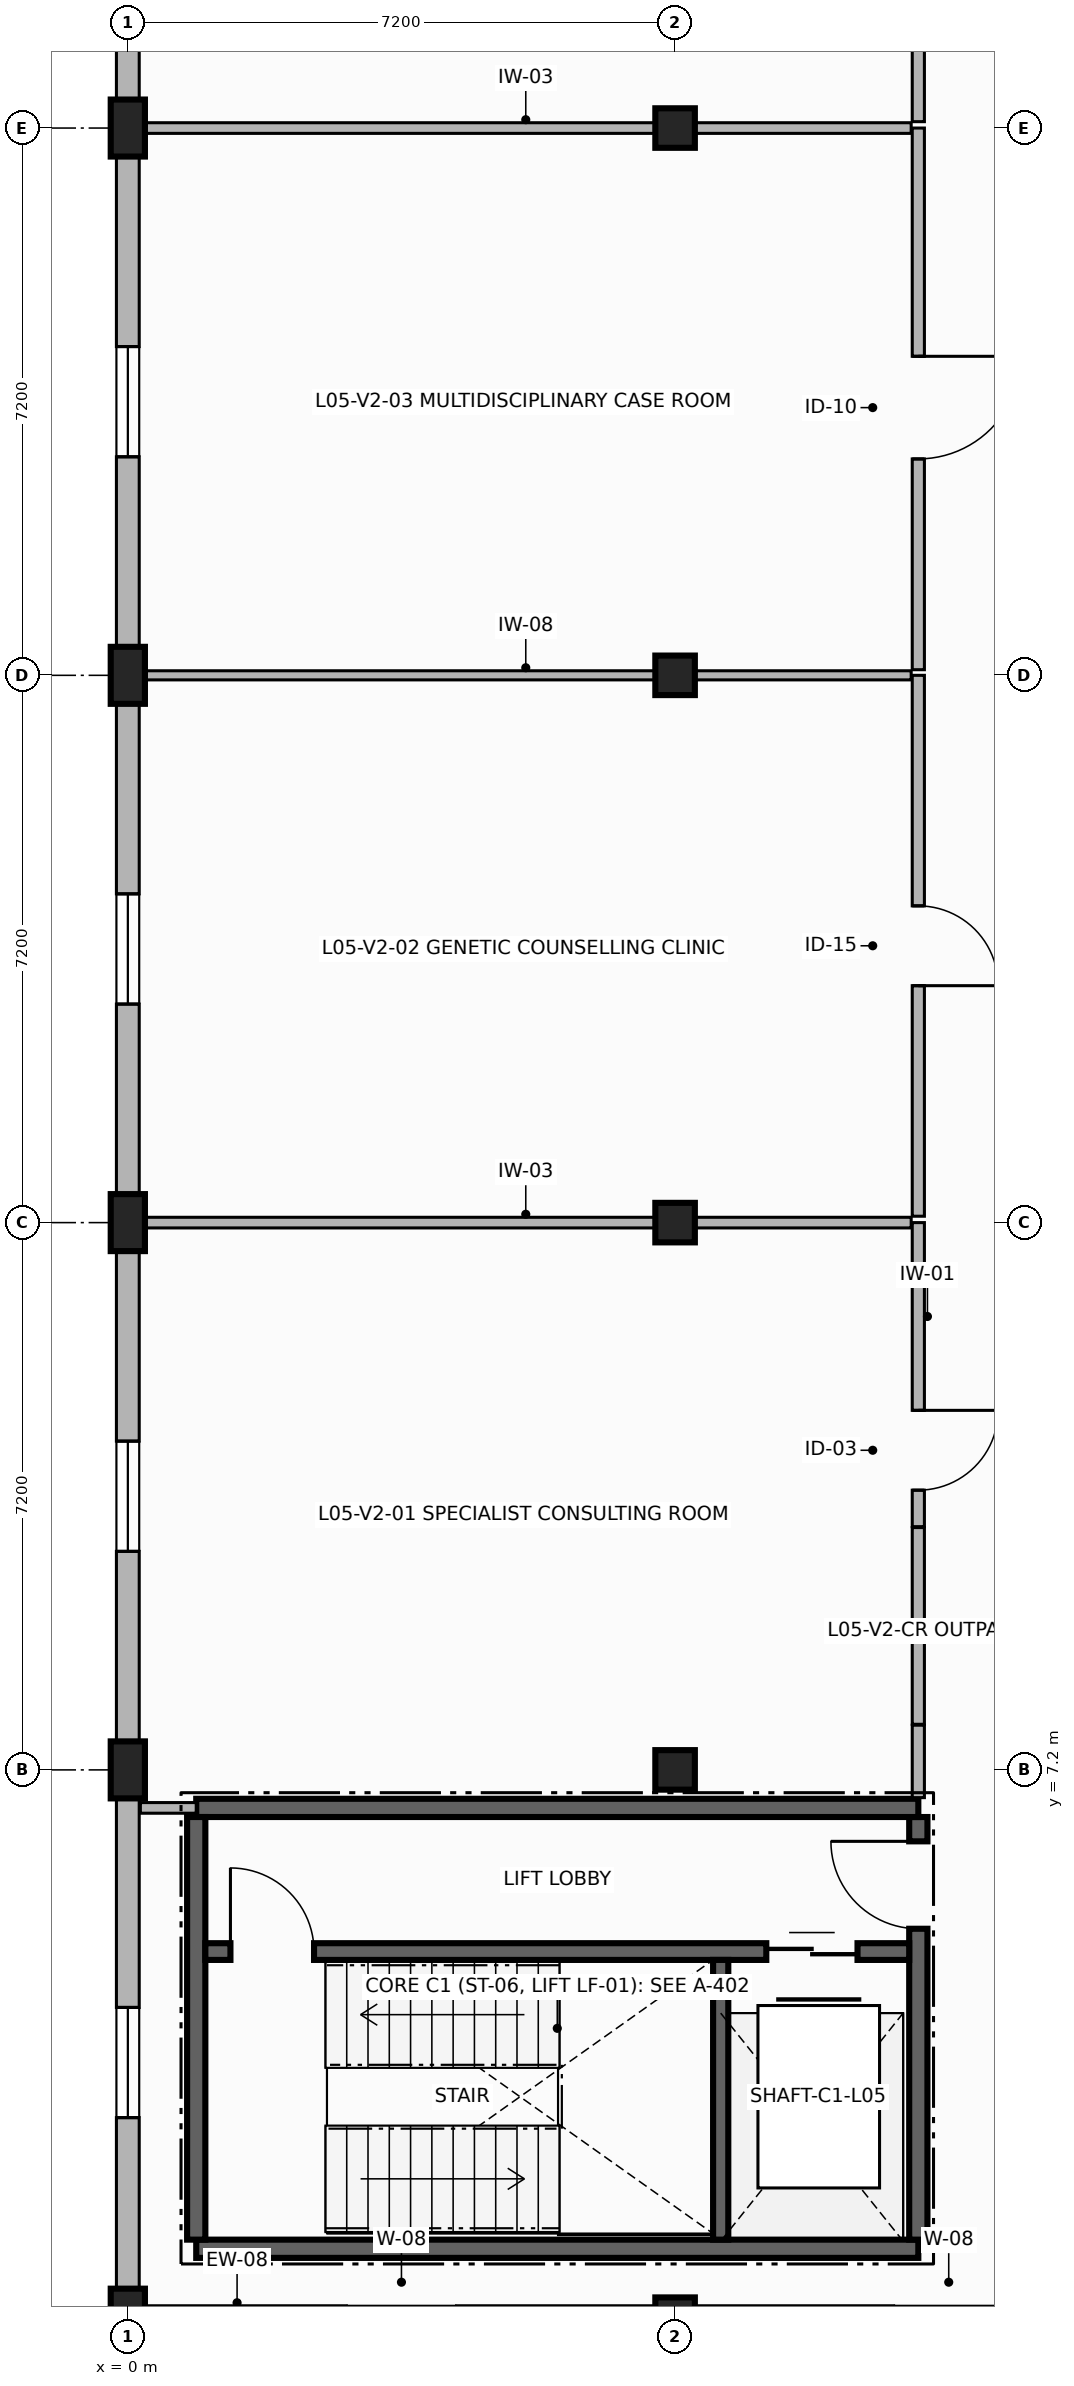
"""IFC4 building model, lengths in metres.
Left out: names, types, materials, properties, quantities, classifications, styles, units other than length and angle.
Written with IfcOpenShell. Run it as: python <this file> out.ifc"""

import sys

from ifc_helpers import new_model, si_unit, direction, frame, frame_2d, origin, origin_with_axes, origin_2d, place, context, subcontext, project, spatial, rectangle, extrude, element, fill, save


model = new_model("IFC4")
c1 = context("Model", 3, precision=1e-05, world=origin(), true_north=direction((0.0, 1.0)))
c2 = subcontext(c1, "Body", "Model", "MODEL_VIEW")
j1 = project(units=[si_unit("LENGTHUNIT", "METRE"), si_unit("PLANEANGLEUNIT", "RADIAN")], contexts=[c1])
p1 = place(None, origin())
s1 = spatial("IfcSite", under=j1, at=p1, CompositionType="ELEMENT")
p2 = place(p1, origin())
s2 = spatial("IfcBuilding", under=s1, at=p2, CompositionType="ELEMENT")
p3 = place(p2, frame((0.0, 0.0, 19.7)))
s3 = spatial("IfcBuildingStorey", under=s2, at=p3, CompositionType="ELEMENT", Elevation=19.7)
for number, where, z_axis, x_axis in (
    (1, (0.0, 0.0, 0.0), (0.0, 0.0, 1.0), (1.0, 0.0, 0.0)),
    (2, (0.0, 7.2, 0.0), (0.0, 0.0, 1.0), (1.0, 0.0, 0.0)),
    (3, (0.0, 14.4, 0.0), (0.0, 0.0, 1.0), (1.0, 0.0, 0.0)),
    (4, (0.0, 21.6, 0.0), (0.0, 0.0, 1.0), (1.0, 0.0, 0.0)),
    (5, (0.0, 28.8, 0.0), (0.0, 0.0, 1.0), (1.0, 0.0, 0.0)),
):
    element("IfcColumn", number, at=place(p3, frame(where, z_axis=z_axis, x_axis=x_axis)), inside=s3, PredefinedType="PILASTER", context=c2, shape_type="SweptSolid", body=[
        extrude(rectangle(XDim=0.45, YDim=0.75, at=origin_2d()), origin(), (0.0, 0.0, 1.0), 3.42),
    ])
for number, where, z_axis, x_axis in (
    (6, (7.2, 0.0, 0.0), (0.0, 0.0, 1.0), (1.0, 0.0, 0.0)),
    (7, (7.2, 7.2, 0.0), (0.0, 0.0, 1.0), (1.0, 0.0, 0.0)),
    (8, (7.2, 14.4, 0.0), (0.0, 0.0, 1.0), (1.0, 0.0, 0.0)),
    (9, (7.2, 21.6, 0.0), (0.0, 0.0, 1.0), (1.0, 0.0, 0.0)),
    (10, (7.2, 28.8, 0.0), (0.0, 0.0, 1.0), (1.0, 0.0, 0.0)),
):
    element("IfcColumn", number, at=place(p3, frame(where, z_axis=z_axis, x_axis=x_axis)), inside=s3, PredefinedType="COLUMN", context=c2, shape_type="SweptSolid", body=[
        extrude(rectangle(XDim=0.52, YDim=0.52, at=origin_2d()), origin(), (0.0, 0.0, 1.0), 3.42),
    ])
p4 = place(p3, origin_with_axes())
e11 = element("IfcWall", 11, at=p4, inside=s3, PredefinedType="SOLIDWALL", context=c2, shape_type="SweptSolid", body=[
    extrude(rectangle(XDim=7.2, YDim=0.3, at=frame_2d((3.6, 0.0))), origin(), (0.0, 0.0, 1.0), 2.8),
])
p5 = place(p4, frame((2.875, 0.0, 0.85)))
e12 = element("IfcOpeningElement", 12, at=p5, cuts=e11, PredefinedType="OPENING", context=c2, shape_type="SweptSolid", body=[
    extrude(rectangle(XDim=1.45, YDim=1.75, at=frame_2d((0.725, 0.875))), frame((0.0, 0.16, 0.0), z_axis=(0.0, -1.0, 0.0), x_axis=(1.0, 0.0, 0.0)), (0.0, 0.0, 1.0), 0.32),
])
p6 = place(p3, frame((7.2, 0.0, 0.0), z_axis=(0.0, 0.0, 1.0), x_axis=(1.0, 0.0, 0.0)))
e13 = element("IfcWall", 13, at=p6, inside=s3, PredefinedType="SOLIDWALL", context=c2, shape_type="SweptSolid", body=[
    extrude(rectangle(XDim=7.2, YDim=0.3, at=frame_2d((3.6, 0.0))), origin(), (0.0, 0.0, 1.0), 2.8),
])
p7 = place(p6, frame((2.875, 0.0, 0.85)))
e14 = element("IfcOpeningElement", 14, at=p7, cuts=e13, PredefinedType="OPENING", context=c2, shape_type="SweptSolid", body=[
    extrude(rectangle(XDim=1.45, YDim=1.75, at=frame_2d((0.725, 0.875))), frame((0.0, 0.16, 0.0), z_axis=(0.0, -1.0, 0.0), x_axis=(1.0, 0.0, 0.0)), (0.0, 0.0, 1.0), 0.32),
])
p8 = place(p3, frame((0.0, 36.0, 0.0), z_axis=(0.0, 0.0, 1.0), x_axis=(0.0, -1.0, 0.0)))
e15 = element("IfcWall", 15, at=p8, inside=s3, PredefinedType="SOLIDWALL", context=c2, shape_type="SweptSolid", body=[
    extrude(rectangle(XDim=7.2, YDim=0.3, at=frame_2d((3.6, 0.0))), origin(), (0.0, 0.0, 1.0), 2.8),
])
p9 = place(p8, frame((2.875, 0.0, 0.85)))
e16 = element("IfcOpeningElement", 16, at=p9, cuts=e15, PredefinedType="OPENING", context=c2, shape_type="SweptSolid", body=[
    extrude(rectangle(XDim=1.45, YDim=1.75, at=frame_2d((0.725, 0.875))), frame((0.0, 0.16, 0.0), z_axis=(0.0, -1.0, 0.0), x_axis=(1.0, 0.0, 0.0)), (0.0, 0.0, 1.0), 0.32),
])
p10 = place(p3, frame((0.0, 28.8, 0.0), z_axis=(0.0, 0.0, 1.0), x_axis=(0.0, -1.0, 0.0)))
e17 = element("IfcWall", 17, at=p10, inside=s3, PredefinedType="SOLIDWALL", context=c2, shape_type="SweptSolid", body=[
    extrude(rectangle(XDim=7.2, YDim=0.3, at=frame_2d((3.6, 0.0))), origin(), (0.0, 0.0, 1.0), 2.8),
])
p11 = place(p10, frame((2.875, 0.0, 0.85)))
e18 = element("IfcOpeningElement", 18, at=p11, cuts=e17, PredefinedType="OPENING", context=c2, shape_type="SweptSolid", body=[
    extrude(rectangle(XDim=1.45, YDim=1.75, at=frame_2d((0.725, 0.875))), frame((0.0, 0.16, 0.0), z_axis=(0.0, -1.0, 0.0), x_axis=(1.0, 0.0, 0.0)), (0.0, 0.0, 1.0), 0.32),
])
p12 = place(p3, frame((0.0, 21.6, 0.0), z_axis=(0.0, 0.0, 1.0), x_axis=(0.0, -1.0, 0.0)))
e19 = element("IfcWall", 19, at=p12, inside=s3, PredefinedType="SOLIDWALL", context=c2, shape_type="SweptSolid", body=[
    extrude(rectangle(XDim=7.2, YDim=0.3, at=frame_2d((3.6, 0.0))), origin(), (0.0, 0.0, 1.0), 2.8),
])
p13 = place(p12, frame((2.875, 0.0, 0.85)))
e20 = element("IfcOpeningElement", 20, at=p13, cuts=e19, PredefinedType="OPENING", context=c2, shape_type="SweptSolid", body=[
    extrude(rectangle(XDim=1.45, YDim=1.75, at=frame_2d((0.725, 0.875))), frame((0.0, 0.16, 0.0), z_axis=(0.0, -1.0, 0.0), x_axis=(1.0, 0.0, 0.0)), (0.0, 0.0, 1.0), 0.32),
])
p14 = place(p3, frame((0.0, 14.4, 0.0), z_axis=(0.0, 0.0, 1.0), x_axis=(0.0, -1.0, 0.0)))
e21 = element("IfcWall", 21, at=p14, inside=s3, PredefinedType="SOLIDWALL", context=c2, shape_type="SweptSolid", body=[
    extrude(rectangle(XDim=7.2, YDim=0.3, at=frame_2d((3.6, 0.0))), origin(), (0.0, 0.0, 1.0), 2.8),
])
p15 = place(p14, frame((2.875, 0.0, 0.85)))
e22 = element("IfcOpeningElement", 22, at=p15, cuts=e21, PredefinedType="OPENING", context=c2, shape_type="SweptSolid", body=[
    extrude(rectangle(XDim=1.45, YDim=1.75, at=frame_2d((0.725, 0.875))), frame((0.0, 0.16, 0.0), z_axis=(0.0, -1.0, 0.0), x_axis=(1.0, 0.0, 0.0)), (0.0, 0.0, 1.0), 0.32),
])
p16 = place(p3, frame((0.0, 7.2, 0.0), z_axis=(0.0, 0.0, 1.0), x_axis=(0.0, -1.0, 0.0)))
e23 = element("IfcWall", 23, at=p16, inside=s3, PredefinedType="SOLIDWALL", context=c2, shape_type="SweptSolid", body=[
    extrude(rectangle(XDim=7.2, YDim=0.3, at=frame_2d((3.6, 0.0))), origin(), (0.0, 0.0, 1.0), 2.8),
])
p17 = place(p16, frame((3.125, 0.0, 0.85)))
e24 = element("IfcOpeningElement", 24, at=p17, cuts=e23, PredefinedType="OPENING", context=c2, shape_type="SweptSolid", body=[
    extrude(rectangle(XDim=1.45, YDim=1.75, at=frame_2d((0.725, 0.875))), frame((0.0, 0.16, 0.0), z_axis=(0.0, -1.0, 0.0), x_axis=(1.0, 0.0, 0.0)), (0.0, 0.0, 1.0), 0.32),
])
p18 = place(p3, frame((0.9, 0.9, 0.0), z_axis=(0.0, 0.0, 1.0), x_axis=(1.0, 0.0, 0.0)))
e25 = element("IfcWall", 25, at=p18, inside=s3, PredefinedType="SHEAR", context=c2, shape_type="SweptSolid", body=[
    extrude(rectangle(XDim=9.5, YDim=0.24, at=frame_2d((4.75, 0.0))), origin(), (0.0, 0.0, 1.0), 3.42),
])
p19 = place(p3, frame((10.4, 1.02, 0.0), z_axis=(0.0, 0.0, 1.0), x_axis=(0.0, 1.0, 0.0)))
e26 = element("IfcWall", 26, at=p19, inside=s3, PredefinedType="SHEAR", context=c2, shape_type="SweptSolid", body=[
    extrude(rectangle(XDim=5.56, YDim=0.24, at=frame_2d((2.78, 0.0))), origin(), (0.0, 0.0, 1.0), 3.42),
])
p20 = place(p19, frame((4.09, 0.0, 0.0)))
e27 = element("IfcOpeningElement", 27, at=p20, cuts=e26, PredefinedType="OPENING", context=c2, shape_type="SweptSolid", body=[
    extrude(rectangle(XDim=1.15, YDim=2.2, at=frame_2d((0.575, 1.1))), frame((0.0, 0.13, 0.0), z_axis=(0.0, -1.0, 0.0), x_axis=(1.0, 0.0, 0.0)), (0.0, 0.0, 1.0), 0.26),
])
p21 = place(p3, frame((10.4, 6.7, 0.0), z_axis=(0.0, 0.0, 1.0), x_axis=(-1.0, 0.0, 0.0)))
e28 = element("IfcWall", 28, at=p21, inside=s3, PredefinedType="SHEAR", context=c2, shape_type="SweptSolid", body=[
    extrude(rectangle(XDim=9.5, YDim=0.24, at=frame_2d((4.75, 0.0))), origin(), (0.0, 0.0, 1.0), 3.42),
])
p22 = place(p3, frame((0.9, 6.58, 0.0), z_axis=(0.0, 0.0, 1.0), x_axis=(0.0, -1.0, 0.0)))
e29 = element("IfcWall", 29, at=p22, inside=s3, PredefinedType="SHEAR", context=c2, shape_type="SweptSolid", body=[
    extrude(rectangle(XDim=5.56, YDim=0.24, at=frame_2d((2.78, 0.0))), origin(), (0.0, 0.0, 1.0), 3.42),
])
p23 = place(p3, frame((1.02, 4.81, 0.0), z_axis=(0.0, 0.0, 1.0), x_axis=(1.0, 0.0, 0.0)))
e30 = element("IfcWall", 30, at=p23, inside=s3, PredefinedType="SHEAR", context=c2, shape_type="SweptSolid", body=[
    extrude(rectangle(XDim=9.26, YDim=0.22, at=frame_2d((4.63, 0.0))), origin(), (0.0, 0.0, 1.0), 3.42),
])
p24 = place(p23, frame((0.33, 0.0, 0.0)))
e31 = element("IfcOpeningElement", 31, at=p24, cuts=e30, PredefinedType="OPENING", context=c2, shape_type="SweptSolid", body=[
    extrude(rectangle(XDim=1.1, YDim=2.15, at=frame_2d((0.55, 1.075))), frame((0.0, 0.12, 0.0), z_axis=(0.0, -1.0, 0.0), x_axis=(1.0, 0.0, 0.0)), (0.0, 0.0, 1.0), 0.24),
])
p25 = place(p23, frame((7.38, 0.0, 0.0)))
e32 = element("IfcOpeningElement", 32, at=p25, cuts=e30, PredefinedType="OPENING", context=c2, shape_type="SweptSolid", body=[
    extrude(rectangle(XDim=1.2, YDim=2.2, at=frame_2d((0.6, 1.1))), frame((0.0, 0.12, 0.0), z_axis=(0.0, -1.0, 0.0), x_axis=(1.0, 0.0, 0.0)), (0.0, 0.0, 1.0), 0.24),
])
p26 = place(p3, frame((7.8, 1.02, 0.0), z_axis=(0.0, 0.0, 1.0), x_axis=(0.0, 1.0, 0.0)))
e33 = element("IfcWall", 33, at=p26, inside=s3, PredefinedType="SHEAR", context=c2, shape_type="SweptSolid", body=[
    extrude(rectangle(XDim=3.68, YDim=0.2, at=frame_2d((1.84, 0.0))), origin(), (0.0, 0.0, 1.0), 3.42),
])
p27 = place(p3, frame((10.4, 14.4, 0.0), z_axis=(0.0, 0.0, 1.0), x_axis=(0.0, -1.0, 0.0)))
e34 = element("IfcWall", 34, at=p27, inside=s3, PredefinedType="PARTITIONING", context=c2, shape_type="SweptSolid", body=[
    extrude(rectangle(XDim=4.0, YDim=0.16, at=frame_2d((2.0, 0.0))), origin(), (0.0, 0.0, 1.0), 2.78),
])
p28 = place(p27, frame((2.47, 0.0, 0.0)))
e35 = element("IfcOpeningElement", 35, at=p28, cuts=e34, PredefinedType="OPENING", context=c2, shape_type="SweptSolid", body=[
    extrude(rectangle(XDim=1.05, YDim=2.15, at=frame_2d((0.525, 1.075))), frame((0.0, 0.09, 0.0), z_axis=(0.0, -1.0, 0.0), x_axis=(1.0, 0.0, 0.0)), (0.0, 0.0, 1.0), 0.18),
])
p29 = place(p3, frame((10.4, 10.388, 0.0), z_axis=(0.0, 0.0, 1.0), x_axis=(0.0, -1.0, 0.0)))
e36 = element("IfcWall", 36, at=p29, inside=s3, PredefinedType="PARTITIONING", context=c2, shape_type="SweptSolid", body=[
    extrude(rectangle(XDim=2.588, YDim=0.16, at=frame_2d((1.294, 0.0))), origin(), (0.0, 0.0, 1.0), 2.78),
])
p30 = place(p3, frame((10.4, 7.788, 0.0), z_axis=(0.0, 0.0, 1.0), x_axis=(0.0, -1.0, 0.0)))
e37 = element("IfcWall", 37, at=p30, inside=s3, PredefinedType="PARTITIONING", context=c2, shape_type="SweptSolid", body=[
    extrude(rectangle(XDim=0.953, YDim=0.16, at=frame_2d((0.477, 0.0))), origin(), (0.0, 0.0, 1.0), 2.78),
])
p31 = place(p3, frame((0.9, 6.7, 0.0), z_axis=(0.0, 0.0, 1.0), x_axis=(-1.0, 0.0, 0.0)))
e38 = element("IfcWall", 38, at=p31, inside=s3, PredefinedType="PARTITIONING", context=c2, shape_type="SweptSolid", body=[
    extrude(rectangle(XDim=0.735, YDim=0.14, at=frame_2d((0.367, 0.0))), origin(), (0.0, 0.0, 1.0), 2.78),
])
p32 = place(p3, frame((0.165, 14.4, 0.0), z_axis=(0.0, 0.0, 1.0), x_axis=(1.0, 0.0, 0.0)))
e39 = element("IfcWall", 39, at=p32, inside=s3, PredefinedType="PARTITIONING", context=c2, shape_type="SweptSolid", body=[
    extrude(rectangle(XDim=10.141, YDim=0.14, at=frame_2d((5.07, 0.0))), origin(), (0.0, 0.0, 1.0), 2.78),
])
p33 = place(p3, frame((10.4, 21.6, 0.0), z_axis=(0.0, 0.0, 1.0), x_axis=(0.0, -1.0, 0.0)))
e40 = element("IfcWall", 40, at=p33, inside=s3, PredefinedType="PARTITIONING", context=c2, shape_type="SweptSolid", body=[
    extrude(rectangle(XDim=7.116, YDim=0.16, at=frame_2d((3.558, 0.0))), origin(), (0.0, 0.0, 1.0), 2.78),
])
p34 = place(p33, frame((3.033, 0.0, 0.0)))
e41 = element("IfcOpeningElement", 41, at=p34, cuts=e40, PredefinedType="OPENING", context=c2, shape_type="SweptSolid", body=[
    extrude(rectangle(XDim=1.05, YDim=2.2, at=frame_2d((0.525, 1.1))), frame((0.0, 0.09, 0.0), z_axis=(0.0, -1.0, 0.0), x_axis=(1.0, 0.0, 0.0)), (0.0, 0.0, 1.0), 0.18),
])
p35 = place(p3, frame((0.165, 21.6, 0.0), z_axis=(0.0, 0.0, 1.0), x_axis=(1.0, 0.0, 0.0)))
e42 = element("IfcWall", 42, at=p35, inside=s3, PredefinedType="PARTITIONING", context=c2, shape_type="SweptSolid", body=[
    extrude(rectangle(XDim=10.141, YDim=0.12, at=frame_2d((5.07, 0.0))), origin(), (0.0, 0.0, 1.0), 2.78),
])
p36 = place(p3, frame((10.4, 28.8, 0.0), z_axis=(0.0, 0.0, 1.0), x_axis=(0.0, -1.0, 0.0)))
e43 = element("IfcWall", 43, at=p36, inside=s3, PredefinedType="PARTITIONING", context=c2, shape_type="SweptSolid", body=[
    extrude(rectangle(XDim=7.126, YDim=0.16, at=frame_2d((3.563, 0.0))), origin(), (0.0, 0.0, 1.0), 2.78),
])
p37 = place(p36, frame((3.003, 0.0, 0.0)))
e44 = element("IfcOpeningElement", 44, at=p37, cuts=e43, PredefinedType="OPENING", context=c2, shape_type="SweptSolid", body=[
    extrude(rectangle(XDim=1.35, YDim=2.25, at=frame_2d((0.675, 1.125))), frame((0.0, 0.09, 0.0), z_axis=(0.0, -1.0, 0.0), x_axis=(1.0, 0.0, 0.0)), (0.0, 0.0, 1.0), 0.18),
])
p38 = place(p3, frame((0.165, 28.8, 0.0), z_axis=(0.0, 0.0, 1.0), x_axis=(1.0, 0.0, 0.0)))
e45 = element("IfcWall", 45, at=p38, inside=s3, PredefinedType="PARTITIONING", context=c2, shape_type="SweptSolid", body=[
    extrude(rectangle(XDim=10.141, YDim=0.14, at=frame_2d((5.07, 0.0))), origin(), (0.0, 0.0, 1.0), 2.78),
])
p39 = place(p3, frame((10.4, 36.665, 0.0), z_axis=(0.0, 0.0, 1.0), x_axis=(0.0, -1.0, 0.0)))
e46 = element("IfcWall", 46, at=p39, inside=s3, PredefinedType="PARTITIONING", context=c2, shape_type="SweptSolid", body=[
    extrude(rectangle(XDim=7.781, YDim=0.16, at=frame_2d((3.891, 0.0))), origin(), (0.0, 0.0, 1.0), 2.78),
])
p40 = place(p39, frame((3.712, 0.0, 0.0)))
e47 = element("IfcOpeningElement", 47, at=p40, cuts=e46, PredefinedType="OPENING", context=c2, shape_type="SweptSolid", body=[
    extrude(rectangle(XDim=1.05, YDim=2.2, at=frame_2d((0.525, 1.1))), frame((0.0, 0.09, 0.0), z_axis=(0.0, -1.0, 0.0), x_axis=(1.0, 0.0, 0.0)), (0.0, 0.0, 1.0), 0.18),
])
p41 = place(p11, origin())
e48 = element("IfcWindow", 48, at=p41, inside=s3, PartitioningType="SINGLE_PANEL", PredefinedType="WINDOW", context=c2, shape_type="SweptSolid", body=[
    extrude(rectangle(XDim=1.45, YDim=1.75, at=frame_2d((0.725, 0.875))), frame((0.0, 0.03, 0.0), z_axis=(0.0, -1.0, 0.0), x_axis=(1.0, 0.0, 0.0)), (0.0, 0.0, 1.0), 0.06),
])
fill(e18, e48)
p42 = place(p13, origin())
e49 = element("IfcWindow", 49, at=p42, inside=s3, PartitioningType="SINGLE_PANEL", PredefinedType="WINDOW", context=c2, shape_type="SweptSolid", body=[
    extrude(rectangle(XDim=1.45, YDim=1.75, at=frame_2d((0.725, 0.875))), frame((0.0, 0.03, 0.0), z_axis=(0.0, -1.0, 0.0), x_axis=(1.0, 0.0, 0.0)), (0.0, 0.0, 1.0), 0.06),
])
fill(e20, e49)
p43 = place(p15, origin())
e50 = element("IfcWindow", 50, at=p43, inside=s3, PartitioningType="SINGLE_PANEL", PredefinedType="WINDOW", context=c2, shape_type="SweptSolid", body=[
    extrude(rectangle(XDim=1.45, YDim=1.75, at=frame_2d((0.725, 0.875))), frame((0.0, 0.03, 0.0), z_axis=(0.0, -1.0, 0.0), x_axis=(1.0, 0.0, 0.0)), (0.0, 0.0, 1.0), 0.06),
])
fill(e22, e50)
p44 = place(p17, origin())
e51 = element("IfcWindow", 51, at=p44, inside=s3, PartitioningType="SINGLE_PANEL", PredefinedType="WINDOW", context=c2, shape_type="SweptSolid", body=[
    extrude(rectangle(XDim=1.45, YDim=1.75, at=frame_2d((0.725, 0.875))), frame((0.0, 0.03, 0.0), z_axis=(0.0, -1.0, 0.0), x_axis=(1.0, 0.0, 0.0)), (0.0, 0.0, 1.0), 0.06),
])
fill(e24, e51)
p45 = place(p24, origin())
e52 = element("IfcDoor", 52, at=p45, inside=s3, OperationType="SINGLE_SWING_LEFT", PredefinedType="DOOR", context=c2, shape_type="SweptSolid", body=[
    extrude(rectangle(XDim=1.1, YDim=2.15, at=frame_2d((0.55, 1.075))), frame((0.0, 0.025, 0.0), z_axis=(0.0, -1.0, 0.0), x_axis=(1.0, 0.0, 0.0)), (0.0, 0.0, 1.0), 0.05),
])
fill(e31, e52)
p46 = place(p25, origin())
e53 = element("IfcDoor", 53, at=p46, inside=s3, OperationType="DOUBLE_DOOR_SLIDING", PredefinedType="DOOR", context=c2, shape_type="SweptSolid", body=[
    extrude(rectangle(XDim=1.2, YDim=2.2, at=frame_2d((0.6, 1.1))), frame((0.0, 0.025, 0.0), z_axis=(0.0, -1.0, 0.0), x_axis=(1.0, 0.0, 0.0)), (0.0, 0.0, 1.0), 0.05),
])
fill(e32, e53)
p47 = place(p20, origin())
e54 = element("IfcDoor", 54, at=p47, inside=s3, OperationType="SINGLE_SWING_RIGHT", PredefinedType="DOOR", context=c2, shape_type="SweptSolid", body=[
    extrude(rectangle(XDim=1.15, YDim=2.2, at=frame_2d((0.575, 1.1))), frame((0.0, 0.025, 0.0), z_axis=(0.0, -1.0, 0.0), x_axis=(1.0, 0.0, 0.0)), (0.0, 0.0, 1.0), 0.05),
])
fill(e27, e54)
p48 = place(p28, origin())
e55 = element("IfcDoor", 55, at=p48, inside=s3, OperationType="SINGLE_SWING_LEFT", PredefinedType="DOOR", context=c2, shape_type="SweptSolid", body=[
    extrude(rectangle(XDim=1.05, YDim=2.15, at=frame_2d((0.525, 1.075))), frame((0.0, 0.025, 0.0), z_axis=(0.0, -1.0, 0.0), x_axis=(1.0, 0.0, 0.0)), (0.0, 0.0, 1.0), 0.05),
])
fill(e35, e55)
p49 = place(p34, origin())
e56 = element("IfcDoor", 56, at=p49, inside=s3, OperationType="SINGLE_SWING_RIGHT", PredefinedType="DOOR", context=c2, shape_type="SweptSolid", body=[
    extrude(rectangle(XDim=1.05, YDim=2.2, at=frame_2d((0.525, 1.1))), frame((0.0, 0.025, 0.0), z_axis=(0.0, -1.0, 0.0), x_axis=(1.0, 0.0, 0.0)), (0.0, 0.0, 1.0), 0.05),
])
fill(e41, e56)
p50 = place(p37, origin())
e57 = element("IfcDoor", 57, at=p50, inside=s3, OperationType="SINGLE_SWING_LEFT", PredefinedType="DOOR", context=c2, shape_type="SweptSolid", body=[
    extrude(rectangle(XDim=1.35, YDim=2.25, at=frame_2d((0.675, 1.125))), frame((0.0, 0.025, 0.0), z_axis=(0.0, -1.0, 0.0), x_axis=(1.0, 0.0, 0.0)), (0.0, 0.0, 1.0), 0.05),
])
fill(e44, e57)
save(model, sys.argv[1])
